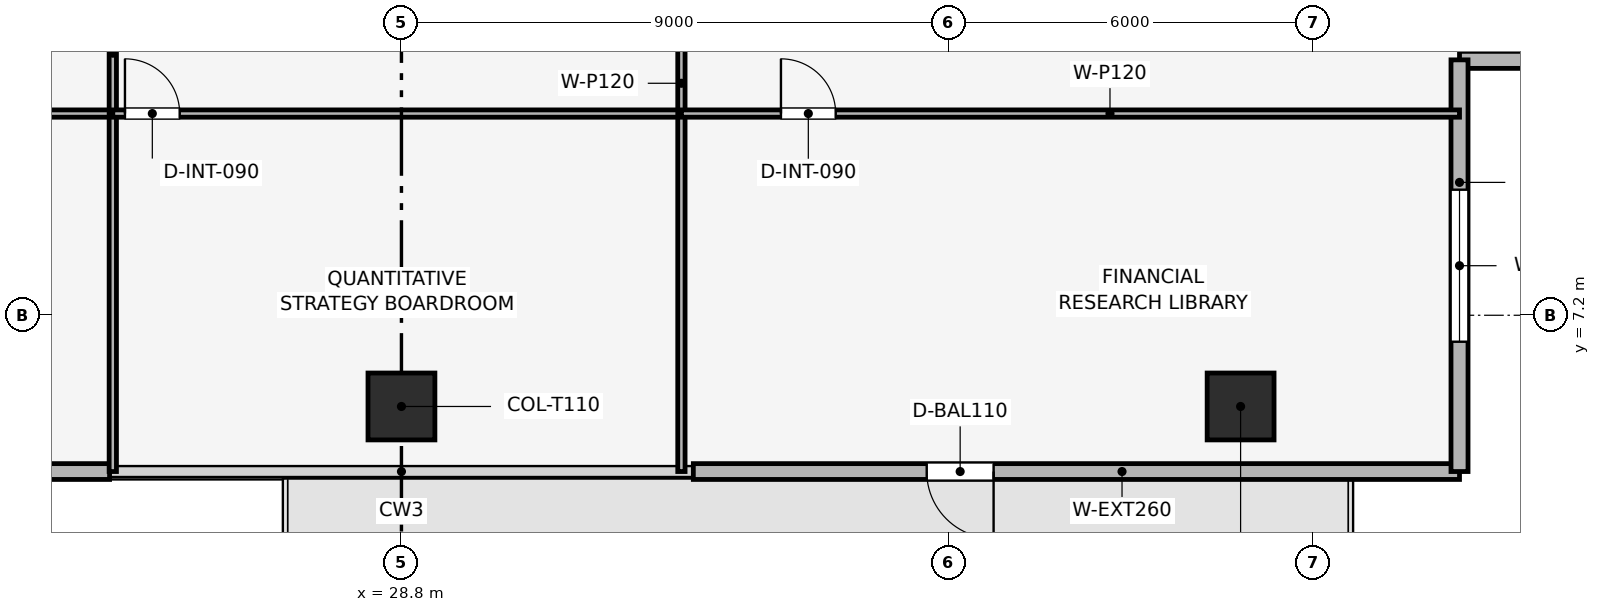
"""IFC4 building model, lengths in metres.
Left out: names, types, materials, properties, quantities, classifications, styles, units other than length and angle.
Written with IfcOpenShell. Run it as: python <this file> out.ifc"""

import sys

from ifc_helpers import new_model, si_unit, direction, frame, frame_2d, origin, origin_2d, place, context, subcontext, project, spatial, rectangle, extrude, element, fill, save


model = new_model("IFC4")
c1 = context("Model", 3, precision=1e-05, world=origin(), true_north=direction((0.0, 1.0)))
c2 = subcontext(c1, "Body", "Model", "MODEL_VIEW")
j1 = project(units=[si_unit("LENGTHUNIT", "METRE"), si_unit("PLANEANGLEUNIT", "RADIAN")], contexts=[c1])
p1 = place(None, origin())
s1 = spatial("IfcSite", under=j1, at=p1, CompositionType="ELEMENT")
p2 = place(p1, origin())
s2 = spatial("IfcBuilding", under=s1, at=p2, CompositionType="ELEMENT")
p3 = place(p2, frame((0.0, 0.0, 168.3)))
s3 = spatial("IfcBuildingStorey", under=s2, at=p3, CompositionType="ELEMENT", Elevation=168.3)
for number, where, z_axis, x_axis in (
    (1, (28.8, 5.7, 0.003), (0.0, 0.0, 1.0), (1.0, 0.0, 0.0)),
    (2, (42.6, 5.7, 0.003), (0.0, 0.0, 1.0), (1.0, 0.0, 0.0)),
):
    element("IfcColumn", number, at=place(p3, frame(where, z_axis=z_axis, x_axis=x_axis)), inside=s3, PredefinedType="COLUMN", context=c2, shape_type="SweptSolid", body=[
        extrude(rectangle(XDim=1.1, YDim=1.1, at=origin_2d()), origin(), (0.0, 0.0, 1.0), 3.489),
    ])
p4 = place(p3, frame((46.2, 4.63, 0.0), z_axis=(0.0, 0.0, 1.0), x_axis=(-1.0, 0.0, 0.0)))
e3 = element("IfcWall", 3, at=p4, inside=s3, PredefinedType="SOLIDWALL", context=c2, shape_type="SweptSolid", body=[
    extrude(rectangle(XDim=12.6, YDim=0.26, at=frame_2d((6.3, 0.0))), origin(), (0.0, 0.0, 1.0), 3.495),
])
p5 = place(p4, frame((7.662, 0.0, 0.0)))
e4 = element("IfcOpeningElement", 4, at=p5, cuts=e3, PredefinedType="OPENING", context=c2, shape_type="SweptSolid", body=[
    extrude(rectangle(XDim=1.1, YDim=2.2, at=frame_2d((0.55, 1.1))), frame((0.0, 0.14, 0.0), z_axis=(0.0, -1.0, 0.0), x_axis=(1.0, 0.0, 0.0)), (0.0, 0.0, 1.0), 0.28),
])
p6 = place(p3, frame((24.0, 4.63, 0.0), z_axis=(0.0, 0.0, 1.0), x_axis=(-1.0, 0.0, 0.0)))
e5 = element("IfcWall", 5, at=p6, inside=s3, PredefinedType="SOLIDWALL", context=c2, shape_type="SweptSolid", body=[
    extrude(rectangle(XDim=12.6, YDim=0.26, at=frame_2d((6.3, 0.0))), origin(), (0.0, 0.0, 1.0), 3.495),
])
p7 = place(p6, frame((2.405, 0.0, 0.9)))
e6 = element("IfcOpeningElement", 6, at=p7, cuts=e5, PredefinedType="OPENING", context=c2, shape_type="SweptSolid", body=[
    extrude(rectangle(XDim=3.8, YDim=1.9, at=frame_2d((1.9, 0.95))), frame((0.0, 0.14, 0.0), z_axis=(0.0, -1.0, 0.0), x_axis=(1.0, 0.0, 0.0)), (0.0, 0.0, 1.0), 0.28),
])
p8 = place(p3, frame((52.97, 11.4, 0.0), z_axis=(0.0, 0.0, 1.0), x_axis=(-1.0, 0.0, 0.0)))
e7 = element("IfcWall", 7, at=p8, inside=s3, PredefinedType="SOLIDWALL", context=c2, shape_type="SweptSolid", body=[
    extrude(rectangle(XDim=6.77, YDim=0.28, at=frame_2d((3.385, 0.0))), origin(), (0.0, 0.0, 1.0), 3.495),
])
p9 = place(p8, frame((2.135, 0.0, 0.9)))
e8 = element("IfcOpeningElement", 8, at=p9, cuts=e7, PredefinedType="OPENING", context=c2, shape_type="SweptSolid", body=[
    extrude(rectangle(XDim=2.5, YDim=1.9, at=frame_2d((1.25, 0.95))), frame((0.0, 0.15, 0.0), z_axis=(0.0, -1.0, 0.0), x_axis=(1.0, 0.0, 0.0)), (0.0, 0.0, 1.0), 0.3),
])
p10 = place(p3, frame((46.2, 11.4, 0.0), z_axis=(0.0, 0.0, 1.0), x_axis=(0.0, -1.0, 0.0)))
e9 = element("IfcWall", 9, at=p10, inside=s3, PredefinedType="SOLIDWALL", context=c2, shape_type="SweptSolid", body=[
    extrude(rectangle(XDim=6.77, YDim=0.28, at=frame_2d((3.385, 0.0))), origin(), (0.0, 0.0, 1.0), 3.495),
])
p11 = place(p10, frame((2.135, 0.0, 0.9)))
e10 = element("IfcOpeningElement", 10, at=p11, cuts=e9, PredefinedType="OPENING", context=c2, shape_type="SweptSolid", body=[
    extrude(rectangle(XDim=2.5, YDim=1.9, at=frame_2d((1.25, 0.95))), frame((0.0, 0.15, 0.0), z_axis=(0.0, -1.0, 0.0), x_axis=(1.0, 0.0, 0.0)), (0.0, 0.0, 1.0), 0.3),
])
p12 = place(p3, frame((15.3, 10.517, 0.0), z_axis=(0.0, 0.0, 1.0), x_axis=(1.0, 0.0, 0.0)))
e11 = element("IfcWall", 11, at=p12, inside=s3, PredefinedType="PARTITIONING", context=c2, shape_type="SweptSolid", body=[
    extrude(rectangle(XDim=8.753, YDim=0.12, at=frame_2d((4.376, 0.0))), origin(), (0.0, 0.0, 1.0), 3.03),
])
p13 = place(p12, frame((6.1, 0.0, 0.0)))
e12 = element("IfcOpeningElement", 12, at=p13, cuts=e11, PredefinedType="OPENING", context=c2, shape_type="SweptSolid", body=[
    extrude(rectangle(XDim=0.9, YDim=2.1, at=frame_2d((0.45, 1.05))), frame((0.0, 0.07, 0.0), z_axis=(0.0, -1.0, 0.0), x_axis=(1.0, 0.0, 0.0)), (0.0, 0.0, 1.0), 0.14),
])
p14 = place(p3, frame((24.053, 4.63, 0.0), z_axis=(0.0, 0.0, 1.0), x_axis=(0.0, 1.0, 0.0)))
e13 = element("IfcWall", 13, at=p14, inside=s3, PredefinedType="PARTITIONING", context=c2, shape_type="SweptSolid", body=[
    extrude(rectangle(XDim=12.77, YDim=0.12, at=frame_2d((6.385, 0.0))), origin(), (0.0, 0.0, 1.0), 2.98),
])
p15 = place(p3, frame((24.053, 10.517, 0.0), z_axis=(0.0, 0.0, 1.0), x_axis=(1.0, 0.0, 0.0)))
e14 = element("IfcWall", 14, at=p15, inside=s3, PredefinedType="PARTITIONING", context=c2, shape_type="SweptSolid", body=[
    extrude(rectangle(XDim=9.351, YDim=0.12, at=frame_2d((4.676, 0.0))), origin(), (0.0, 0.0, 1.0), 3.03),
])
p16 = place(p15, frame((0.2, 0.0, 0.0)))
e15 = element("IfcOpeningElement", 15, at=p16, cuts=e14, PredefinedType="OPENING", context=c2, shape_type="SweptSolid", body=[
    extrude(rectangle(XDim=0.9, YDim=2.1, at=frame_2d((0.45, 1.05))), frame((0.0, 0.07, 0.0), z_axis=(0.0, -1.0, 0.0), x_axis=(1.0, 0.0, 0.0)), (0.0, 0.0, 1.0), 0.14),
])
p17 = place(p3, frame((33.404, 4.63, 0.0), z_axis=(0.0, 0.0, 1.0), x_axis=(0.0, 1.0, 0.0)))
e16 = element("IfcWall", 16, at=p17, inside=s3, PredefinedType="PARTITIONING", context=c2, shape_type="SweptSolid", body=[
    extrude(rectangle(XDim=12.77, YDim=0.12, at=frame_2d((6.385, 0.0))), origin(), (0.0, 0.0, 1.0), 2.98),
])
p18 = place(p3, frame((33.404, 10.517, 0.0), z_axis=(0.0, 0.0, 1.0), x_axis=(1.0, 0.0, 0.0)))
e17 = element("IfcWall", 17, at=p18, inside=s3, PredefinedType="PARTITIONING", context=c2, shape_type="SweptSolid", body=[
    extrude(rectangle(XDim=12.796, YDim=0.12, at=frame_2d((6.398, 0.0))), origin(), (0.0, 0.0, 1.0), 2.98),
])
p19 = place(p18, frame((1.637, 0.0, 0.0)))
e18 = element("IfcOpeningElement", 18, at=p19, cuts=e17, PredefinedType="OPENING", context=c2, shape_type="SweptSolid", body=[
    extrude(rectangle(XDim=0.9, YDim=2.1, at=frame_2d((0.45, 1.05))), frame((0.0, 0.07, 0.0), z_axis=(0.0, -1.0, 0.0), x_axis=(1.0, 0.0, 0.0)), (0.0, 0.0, 1.0), 0.14),
])
p20 = place(p5, origin())
e19 = element("IfcDoor", 19, at=p20, inside=s3, OperationType="SINGLE_SWING_LEFT", PredefinedType="DOOR", context=c2, shape_type="SweptSolid", body=[
    extrude(rectangle(XDim=1.1, YDim=2.2, at=frame_2d((0.55, 1.1))), frame((0.0, 0.025, 0.0), z_axis=(0.0, -1.0, 0.0), x_axis=(1.0, 0.0, 0.0)), (0.0, 0.0, 1.0), 0.05),
])
fill(e4, e19)
p21 = place(p11, origin())
e20 = element("IfcWindow", 20, at=p21, inside=s3, PartitioningType="SINGLE_PANEL", PredefinedType="WINDOW", context=c2, shape_type="SweptSolid", body=[
    extrude(rectangle(XDim=2.5, YDim=1.9, at=frame_2d((1.25, 0.95))), frame((0.0, 0.03, 0.0), z_axis=(0.0, -1.0, 0.0), x_axis=(1.0, 0.0, 0.0)), (0.0, 0.0, 1.0), 0.06),
])
fill(e10, e20)
p22 = place(p16, origin())
e21 = element("IfcDoor", 21, at=p22, inside=s3, OperationType="SINGLE_SWING_LEFT", PredefinedType="DOOR", context=c2, shape_type="SweptSolid", body=[
    extrude(rectangle(XDim=0.9, YDim=2.1, at=frame_2d((0.45, 1.05))), frame((0.0, 0.025, 0.0), z_axis=(0.0, -1.0, 0.0), x_axis=(1.0, 0.0, 0.0)), (0.0, 0.0, 1.0), 0.05),
])
fill(e15, e21)
p23 = place(p19, origin())
e22 = element("IfcDoor", 22, at=p23, inside=s3, OperationType="SINGLE_SWING_LEFT", PredefinedType="DOOR", context=c2, shape_type="SweptSolid", body=[
    extrude(rectangle(XDim=0.9, YDim=2.1, at=frame_2d((0.45, 1.05))), frame((0.0, 0.025, 0.0), z_axis=(0.0, -1.0, 0.0), x_axis=(1.0, 0.0, 0.0)), (0.0, 0.0, 1.0), 0.05),
])
fill(e18, e22)
save(model, sys.argv[1])
